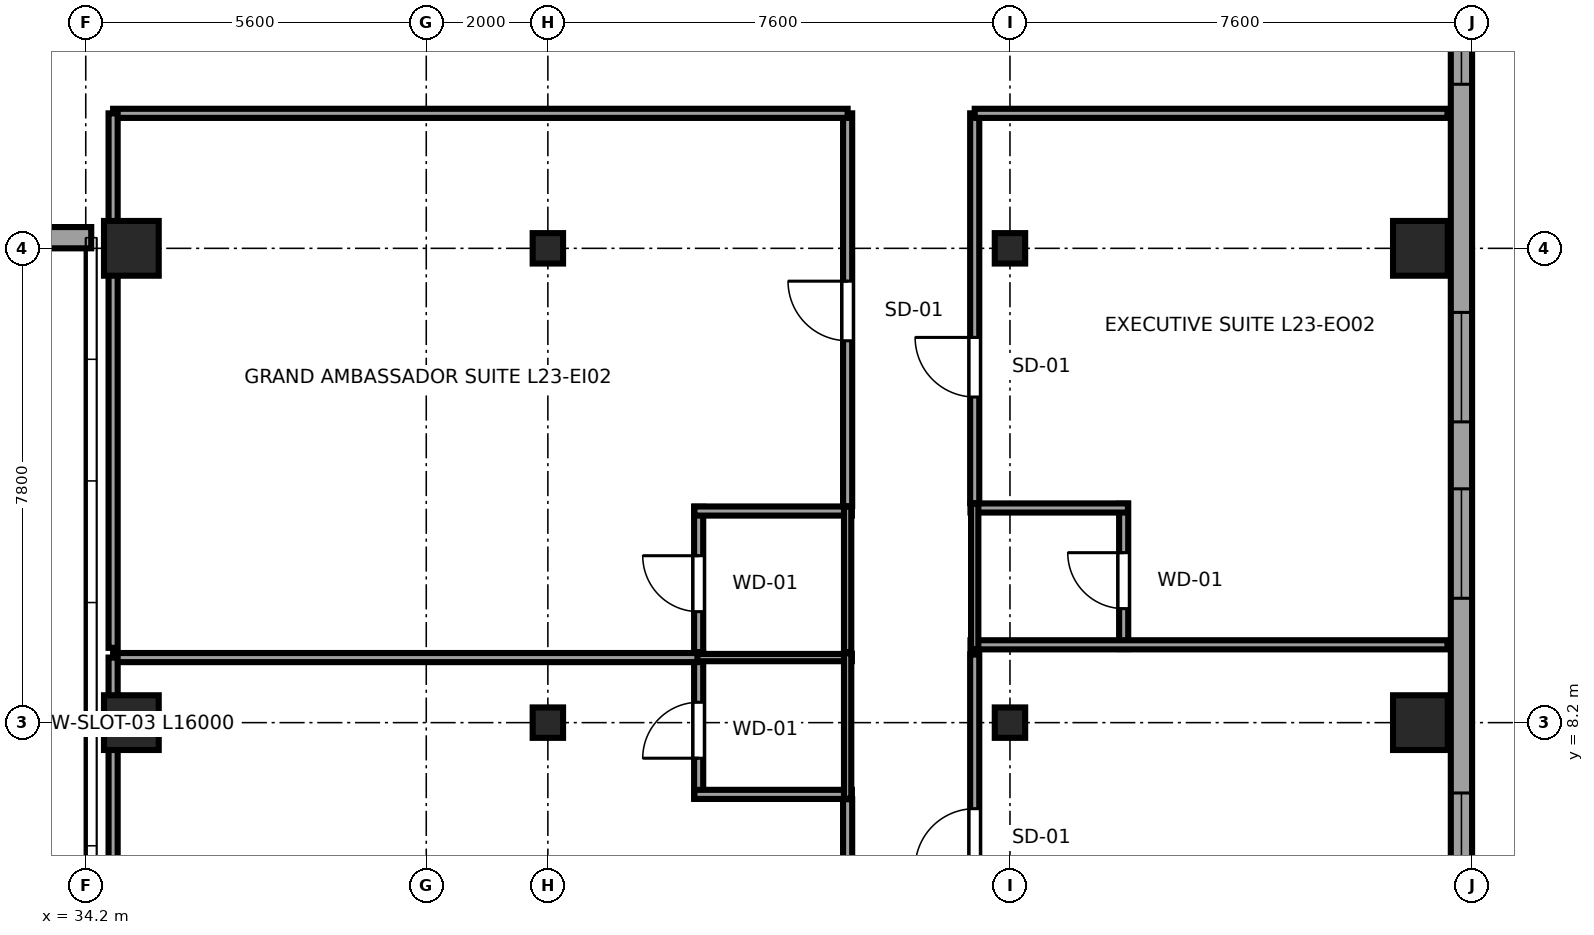
"""IFC4 building model, lengths in metres.
Left out: names, types, materials, properties, quantities, classifications, styles, units other than length and angle.
Written with IfcOpenShell. Run it as: python <this file> out.ifc"""

import sys

from ifc_helpers import new_model, si_unit, direction, frame, frame_2d, origin, origin_2d, place, context, subcontext, project, spatial, rectangle, i_section, extrude, source, transform, mapped, element, fill, save


model = new_model("IFC4")
c1 = context("Model", 3, precision=1e-05, world=origin(), true_north=direction((0.0, 1.0)))
c2 = subcontext(c1, "Body", "Model", "MODEL_VIEW")
j1 = project(units=[si_unit("LENGTHUNIT", "METRE"), si_unit("PLANEANGLEUNIT", "RADIAN")], contexts=[c1])
p1 = place(None, origin())
s1 = spatial("IfcSite", under=j1, at=p1, CompositionType="ELEMENT")
p2 = place(p1, origin())
s2 = spatial("IfcBuilding", under=s1, at=p2, CompositionType="ELEMENT")
p3 = place(p2, frame((0.0, 0.0, 92.35)))
s3 = spatial("IfcBuildingStorey", under=s2, at=p3, CompositionType="ELEMENT", Elevation=92.35)
m1 = source(origin(), c2, "Body", "SweptSolid", [
    extrude(rectangle(XDim=0.9, YDim=0.9, at=origin_2d()), origin(), (0.0, 0.0, 1.0), 3.55),
])
for number, where, z_axis, x_axis in (
    (1, (34.95, 8.2, 0.0), (0.0, 0.0, 1.0), (1.0, 0.0, 0.0)),
    (2, (34.95, 16.0, 0.0), (0.0, 0.0, 1.0), (1.0, 0.0, 0.0)),
):
    element("IfcColumn", number, at=place(p3, frame(where, z_axis=z_axis, x_axis=x_axis)), inside=s3, PredefinedType="COLUMN", context=c2, shape_type="MappedRepresentation", body=[
        mapped(m1, transform((0.0, 0.0, 0.0), x_axis=(1.0, 0.0, 0.0), y_axis=(0.0, 1.0, 0.0), z_axis=(0.0, 0.0, 1.0), scale=1.0)),
    ])
m2 = source(origin(), c2, "Body", "SweptSolid", [
    extrude(i_section(OverallWidth=0.5, OverallDepth=0.5, WebThickness=0.022, FlangeThickness=0.034, at=origin_2d()), origin(), (0.0, 0.0, 1.0), 3.55),
])
for number, where, z_axis, x_axis in (
    (3, (41.8, 8.2, 0.0), (0.0, 0.0, 1.0), (1.0, 0.0, 0.0)),
    (4, (41.8, 16.0, 0.0), (0.0, 0.0, 1.0), (1.0, 0.0, 0.0)),
    (5, (49.4, 8.2, 0.0), (0.0, 0.0, 1.0), (1.0, 0.0, 0.0)),
    (6, (49.4, 16.0, 0.0), (0.0, 0.0, 1.0), (1.0, 0.0, 0.0)),
):
    element("IfcColumn", number, at=place(p3, frame(where, z_axis=z_axis, x_axis=x_axis)), inside=s3, PredefinedType="COLUMN", context=c2, shape_type="MappedRepresentation", body=[
        mapped(m2, transform((0.0, 0.0, 0.0), x_axis=(1.0, 0.0, 0.0), y_axis=(0.0, 1.0, 0.0), z_axis=(0.0, 0.0, 1.0), scale=1.0)),
    ])
for number, where, z_axis, x_axis in (
    (7, (56.15, 8.2, 0.0), (0.0, 0.0, 1.0), (1.0, 0.0, 0.0)),
    (8, (56.15, 16.0, 0.0), (0.0, 0.0, 1.0), (1.0, 0.0, 0.0)),
):
    element("IfcColumn", number, at=place(p3, frame(where, z_axis=z_axis, x_axis=x_axis)), inside=s3, PredefinedType="COLUMN", context=c2, shape_type="MappedRepresentation", body=[
        mapped(m1, transform((0.0, 0.0, 0.0), x_axis=(1.0, 0.0, 0.0), y_axis=(0.0, 1.0, 0.0), z_axis=(0.0, 0.0, 1.0), scale=1.0)),
    ])
p4 = place(p3, frame((22.71, 16.175, 0.0), z_axis=(0.0, 0.0, 1.0), x_axis=(1.0, 0.0, 0.0)))
e9 = element("IfcWall", 9, at=p4, inside=s3, PredefinedType="SOLIDWALL", context=c2, shape_type="SweptSolid", body=[
    extrude(rectangle(XDim=11.58, YDim=0.35, at=frame_2d((5.79, 0.0))), origin(), (0.0, 0.0, 1.0), 2.628),
])
p5 = place(p4, frame((2.295, 0.0, 0.68)))
e10 = element("IfcOpeningElement", 10, at=p5, cuts=e9, PredefinedType="OPENING", context=c2, shape_type="SweptSolid", body=[
    extrude(rectangle(XDim=1.8, YDim=1.85, at=frame_2d((0.9, 0.925))), frame((0.0, 0.185, 0.0), z_axis=(0.0, -1.0, 0.0), x_axis=(1.0, 0.0, 0.0)), (0.0, 0.0, 1.0), 0.37),
])
p6 = place(p4, frame((7.485, 0.0, 0.68)))
e11 = element("IfcOpeningElement", 11, at=p6, cuts=e9, PredefinedType="OPENING", context=c2, shape_type="SweptSolid", body=[
    extrude(rectangle(XDim=1.8, YDim=1.85, at=frame_2d((0.9, 0.925))), frame((0.0, 0.185, 0.0), z_axis=(0.0, -1.0, 0.0), x_axis=(1.0, 0.0, 0.0)), (0.0, 0.0, 1.0), 0.37),
])
p7 = place(p3, frame((56.825, 4.617, 0.0), z_axis=(0.0, 0.0, 1.0), x_axis=(0.0, 1.0, 0.0)))
e12 = element("IfcWall", 12, at=p7, inside=s3, PredefinedType="SOLIDWALL", context=c2, shape_type="SweptSolid", body=[
    extrude(rectangle(XDim=36.766, YDim=0.35, at=frame_2d((18.383, 0.0))), origin(), (0.0, 0.0, 1.0), 3.25),
])
p8 = place(p7, frame((0.626, 0.0, 0.68)))
e13 = element("IfcOpeningElement", 13, at=p8, cuts=e12, PredefinedType="OPENING", context=c2, shape_type="SweptSolid", body=[
    extrude(rectangle(XDim=1.8, YDim=1.85, at=frame_2d((0.9, 0.925))), frame((0.0, 0.185, 0.0), z_axis=(0.0, -1.0, 0.0), x_axis=(1.0, 0.0, 0.0)), (0.0, 0.0, 1.0), 0.37),
])
p9 = place(p7, frame((5.628, 0.0, 0.68)))
e14 = element("IfcOpeningElement", 14, at=p9, cuts=e12, PredefinedType="OPENING", context=c2, shape_type="SweptSolid", body=[
    extrude(rectangle(XDim=1.8, YDim=1.85, at=frame_2d((0.9, 0.925))), frame((0.0, 0.185, 0.0), z_axis=(0.0, -1.0, 0.0), x_axis=(1.0, 0.0, 0.0)), (0.0, 0.0, 1.0), 0.37),
])
p10 = place(p7, frame((8.529, 0.0, 0.68)))
e15 = element("IfcOpeningElement", 15, at=p10, cuts=e12, PredefinedType="OPENING", context=c2, shape_type="SweptSolid", body=[
    extrude(rectangle(XDim=1.8, YDim=1.85, at=frame_2d((0.9, 0.925))), frame((0.0, 0.185, 0.0), z_axis=(0.0, -1.0, 0.0), x_axis=(1.0, 0.0, 0.0)), (0.0, 0.0, 1.0), 0.37),
])
p11 = place(p7, frame((14.081, 0.0, 0.68)))
e16 = element("IfcOpeningElement", 16, at=p11, cuts=e12, PredefinedType="OPENING", context=c2, shape_type="SweptSolid", body=[
    extrude(rectangle(XDim=1.8, YDim=1.85, at=frame_2d((0.9, 0.925))), frame((0.0, 0.185, 0.0), z_axis=(0.0, -1.0, 0.0), x_axis=(1.0, 0.0, 0.0)), (0.0, 0.0, 1.0), 0.37),
])
p12 = place(p7, frame((25.386, 0.0, 0.68)))
e17 = element("IfcOpeningElement", 17, at=p12, cuts=e12, PredefinedType="OPENING", context=c2, shape_type="SweptSolid", body=[
    extrude(rectangle(XDim=1.8, YDim=1.85, at=frame_2d((0.9, 0.925))), frame((0.0, 0.185, 0.0), z_axis=(0.0, -1.0, 0.0), x_axis=(1.0, 0.0, 0.0)), (0.0, 0.0, 1.0), 0.37),
])
p13 = place(p7, frame((30.388, 0.0, 0.68)))
e18 = element("IfcOpeningElement", 18, at=p13, cuts=e12, PredefinedType="OPENING", context=c2, shape_type="SweptSolid", body=[
    extrude(rectangle(XDim=1.8, YDim=1.85, at=frame_2d((0.9, 0.925))), frame((0.0, 0.185, 0.0), z_axis=(0.0, -1.0, 0.0), x_axis=(1.0, 0.0, 0.0)), (0.0, 0.0, 1.0), 0.37),
])
p14 = place(p7, frame((33.29, 0.0, 0.68)))
e19 = element("IfcOpeningElement", 19, at=p14, cuts=e12, PredefinedType="OPENING", context=c2, shape_type="SweptSolid", body=[
    extrude(rectangle(XDim=1.8, YDim=1.85, at=frame_2d((0.9, 0.925))), frame((0.0, 0.185, 0.0), z_axis=(0.0, -1.0, 0.0), x_axis=(1.0, 0.0, 0.0)), (0.0, 0.0, 1.0), 0.37),
])
p15 = place(p3, frame((44.28, 6.95, 0.0), z_axis=(0.0, 0.0, 1.0), x_axis=(0.0, 1.0, 0.0)))
e20 = element("IfcWall", 20, at=p15, inside=s3, PredefinedType="PARTITIONING", context=c2, shape_type="SweptSolid", body=[
    extrude(rectangle(XDim=2.39, YDim=0.15, at=frame_2d((1.195, 0.0))), origin(), (0.0, 0.0, 1.0), 3.25),
])
p16 = place(p15, frame((0.665, 0.0, 0.0)))
e21 = element("IfcOpeningElement", 21, at=p16, cuts=e20, PredefinedType="OPENING", context=c2, shape_type="SweptSolid", body=[
    extrude(rectangle(XDim=0.92, YDim=2.01, at=frame_2d((0.46, 1.005))), frame((0.0, 0.085, 0.0), z_axis=(0.0, -1.0, 0.0), x_axis=(1.0, 0.0, 0.0)), (0.0, 0.0, 1.0), 0.17),
])
p17 = place(p3, frame((44.21, 7.02, 0.0), z_axis=(0.0, 0.0, 1.0), x_axis=(1.0, 0.0, 0.0)))
e22 = element("IfcWall", 22, at=p17, inside=s3, PredefinedType="PARTITIONING", context=c2, shape_type="SweptSolid", body=[
    extrude(rectangle(XDim=2.59, YDim=0.15, at=frame_2d((1.295, 0.0))), origin(), (0.0, 0.0, 1.0), 3.25),
])
p18 = place(p3, frame((44.21, 9.27, 0.0), z_axis=(0.0, 0.0, 1.0), x_axis=(1.0, 0.0, 0.0)))
e23 = element("IfcWall", 23, at=p18, inside=s3, PredefinedType="PLUMBINGWALL", context=c2, shape_type="SweptSolid", body=[
    extrude(rectangle(XDim=2.59, YDim=0.12, at=frame_2d((1.295, 0.0))), origin(), (0.0, 0.0, 1.0), 3.25),
])
p19 = place(p3, frame((46.73, 6.95, 0.0), z_axis=(0.0, 0.0, 1.0), x_axis=(0.0, 1.0, 0.0)))
e24 = element("IfcWall", 24, at=p19, inside=s3, PredefinedType="PLUMBINGWALL", context=c2, shape_type="SweptSolid", body=[
    extrude(rectangle(XDim=2.39, YDim=0.12, at=frame_2d((1.195, 0.0))), origin(), (0.0, 0.0, 1.0), 3.25),
])
p20 = place(p3, frame((44.28, 9.36, 0.0), z_axis=(0.0, 0.0, 1.0), x_axis=(0.0, 1.0, 0.0)))
e25 = element("IfcWall", 25, at=p20, inside=s3, PredefinedType="PARTITIONING", context=c2, shape_type="SweptSolid", body=[
    extrude(rectangle(XDim=2.39, YDim=0.15, at=frame_2d((1.195, 0.0))), origin(), (0.0, 0.0, 1.0), 3.25),
])
p21 = place(p20, frame((0.665, 0.0, 0.0)))
e26 = element("IfcOpeningElement", 26, at=p21, cuts=e25, PredefinedType="OPENING", context=c2, shape_type="SweptSolid", body=[
    extrude(rectangle(XDim=0.92, YDim=2.01, at=frame_2d((0.46, 1.005))), frame((0.0, 0.085, 0.0), z_axis=(0.0, -1.0, 0.0), x_axis=(1.0, 0.0, 0.0)), (0.0, 0.0, 1.0), 0.17),
])
p22 = place(p3, frame((44.21, 11.68, 0.0), z_axis=(0.0, 0.0, 1.0), x_axis=(1.0, 0.0, 0.0)))
e27 = element("IfcWall", 27, at=p22, inside=s3, PredefinedType="PARTITIONING", context=c2, shape_type="SweptSolid", body=[
    extrude(rectangle(XDim=2.59, YDim=0.15, at=frame_2d((1.295, 0.0))), origin(), (0.0, 0.0, 1.0), 3.25),
])
p23 = place(p3, frame((46.73, 9.36, 0.0), z_axis=(0.0, 0.0, 1.0), x_axis=(0.0, 1.0, 0.0)))
e28 = element("IfcWall", 28, at=p23, inside=s3, PredefinedType="PLUMBINGWALL", context=c2, shape_type="SweptSolid", body=[
    extrude(rectangle(XDim=2.39, YDim=0.12, at=frame_2d((1.195, 0.0))), origin(), (0.0, 0.0, 1.0), 3.25),
])
p24 = place(p3, frame((51.27, 9.41, 0.0), z_axis=(0.0, 0.0, 1.0), x_axis=(0.0, 1.0, 0.0)))
e29 = element("IfcWall", 29, at=p24, inside=s3, PredefinedType="PARTITIONING", context=c2, shape_type="SweptSolid", body=[
    extrude(rectangle(XDim=2.39, YDim=0.15, at=frame_2d((1.195, 0.0))), origin(), (0.0, 0.0, 1.0), 3.25),
])
p25 = place(p24, frame((0.665, 0.0, 0.0)))
e30 = element("IfcOpeningElement", 30, at=p25, cuts=e29, PredefinedType="OPENING", context=c2, shape_type="SweptSolid", body=[
    extrude(rectangle(XDim=0.92, YDim=2.01, at=frame_2d((0.46, 1.005))), frame((0.0, 0.085, 0.0), z_axis=(0.0, -1.0, 0.0), x_axis=(1.0, 0.0, 0.0)), (0.0, 0.0, 1.0), 0.17),
])
p26 = place(p3, frame((48.75, 9.48, 0.0), z_axis=(0.0, 0.0, 1.0), x_axis=(1.0, 0.0, 0.0)))
e31 = element("IfcWall", 31, at=p26, inside=s3, PredefinedType="PARTITIONING", context=c2, shape_type="SweptSolid", body=[
    extrude(rectangle(XDim=7.845, YDim=0.15, at=frame_2d((3.922, 0.0))), origin(), (0.0, 0.0, 1.0), 3.25),
])
p27 = place(p3, frame((48.75, 11.73, 0.0), z_axis=(0.0, 0.0, 1.0), x_axis=(1.0, 0.0, 0.0)))
e32 = element("IfcWall", 32, at=p27, inside=s3, PredefinedType="PARTITIONING", context=c2, shape_type="SweptSolid", body=[
    extrude(rectangle(XDim=2.59, YDim=0.15, at=frame_2d((1.295, 0.0))), origin(), (0.0, 0.0, 1.0), 3.25),
])
p28 = place(p3, frame((48.82, 9.41, 0.0), z_axis=(0.0, 0.0, 1.0), x_axis=(0.0, 1.0, 0.0)))
e33 = element("IfcWall", 33, at=p28, inside=s3, PredefinedType="PLUMBINGWALL", context=c2, shape_type="SweptSolid", body=[
    extrude(rectangle(XDim=2.39, YDim=0.12, at=frame_2d((1.195, 0.0))), origin(), (0.0, 0.0, 1.0), 3.25),
])
p29 = place(p3, frame((46.73, 0.405, 0.0), z_axis=(0.0, 0.0, 1.0), x_axis=(0.0, 1.0, 0.0)))
e34 = element("IfcWall", 34, at=p29, inside=s3, PredefinedType="PARTITIONING", context=c2, shape_type="SweptSolid", body=[
    extrude(rectangle(XDim=6.535, YDim=0.15, at=frame_2d((3.268, 0.0))), origin(), (0.0, 0.0, 1.0), 3.25),
])
p30 = place(p29, frame((2.785, 0.0, 0.0)))
e35 = element("IfcOpeningElement", 35, at=p30, cuts=e34, PredefinedType="OPENING", context=c2, shape_type="SweptSolid", body=[
    extrude(rectangle(XDim=0.98, YDim=2.12, at=frame_2d((0.49, 1.06))), frame((0.0, 0.085, 0.0), z_axis=(0.0, -1.0, 0.0), x_axis=(1.0, 0.0, 0.0)), (0.0, 0.0, 1.0), 0.17),
])
p31 = place(p3, frame((34.65, 9.27, 0.0), z_axis=(0.0, 0.0, 1.0), x_axis=(1.0, 0.0, 0.0)))
e36 = element("IfcWall", 36, at=p31, inside=s3, PredefinedType="PARTITIONING", context=c2, shape_type="SweptSolid", body=[
    extrude(rectangle(XDim=9.61, YDim=0.15, at=frame_2d((4.805, 0.0))), origin(), (0.0, 0.0, 1.0), 3.25),
])
p32 = place(p3, frame((34.65, 0.405, 0.0), z_axis=(0.0, 0.0, 1.0), x_axis=(0.0, 1.0, 0.0)))
e37 = element("IfcWall", 37, at=p32, inside=s3, PredefinedType="PARTITIONING", context=c2, shape_type="SweptSolid", body=[
    extrude(rectangle(XDim=8.865, YDim=0.15, at=frame_2d((4.433, 0.0))), origin(), (0.0, 0.0, 1.0), 3.25),
])
p33 = place(p3, frame((46.73, 11.76, 0.0), z_axis=(0.0, 0.0, 1.0), x_axis=(0.0, 1.0, 0.0)))
e38 = element("IfcWall", 38, at=p33, inside=s3, PredefinedType="PARTITIONING", context=c2, shape_type="SweptSolid", body=[
    extrude(rectangle(XDim=6.46, YDim=0.15, at=frame_2d((3.23, 0.0))), origin(), (0.0, 0.0, 1.0), 3.25),
])
p34 = place(p33, frame((2.72, 0.0, 0.0)))
e39 = element("IfcOpeningElement", 39, at=p34, cuts=e38, PredefinedType="OPENING", context=c2, shape_type="SweptSolid", body=[
    extrude(rectangle(XDim=0.98, YDim=2.12, at=frame_2d((0.49, 1.06))), frame((0.0, 0.085, 0.0), z_axis=(0.0, -1.0, 0.0), x_axis=(1.0, 0.0, 0.0)), (0.0, 0.0, 1.0), 0.17),
])
p35 = place(p3, frame((34.65, 18.22, 0.0), z_axis=(0.0, 0.0, 1.0), x_axis=(1.0, 0.0, 0.0)))
e40 = element("IfcWall", 40, at=p35, inside=s3, PredefinedType="PARTITIONING", context=c2, shape_type="SweptSolid", body=[
    extrude(rectangle(XDim=12.08, YDim=0.15, at=frame_2d((6.04, 0.0))), origin(), (0.0, 0.0, 1.0), 3.25),
])
p36 = place(p3, frame((34.65, 9.43, 0.0), z_axis=(0.0, 0.0, 1.0), x_axis=(0.0, 1.0, 0.0)))
e41 = element("IfcWall", 41, at=p36, inside=s3, PredefinedType="PARTITIONING", context=c2, shape_type="SweptSolid", body=[
    extrude(rectangle(XDim=8.79, YDim=0.15, at=frame_2d((4.395, 0.0))), origin(), (0.0, 0.0, 1.0), 3.25),
])
p37 = place(p3, frame((48.82, 3.31, 0.0), z_axis=(0.0, 0.0, 1.0), x_axis=(0.0, 1.0, 0.0)))
e42 = element("IfcWall", 42, at=p37, inside=s3, PredefinedType="PARTITIONING", context=c2, shape_type="SweptSolid", body=[
    extrude(rectangle(XDim=6.01, YDim=0.15, at=frame_2d((3.005, 0.0))), origin(), (0.0, 0.0, 1.0), 3.25),
])
p38 = place(p37, frame((2.495, 0.0, 0.0)))
e43 = element("IfcOpeningElement", 43, at=p38, cuts=e42, PredefinedType="OPENING", context=c2, shape_type="SweptSolid", body=[
    extrude(rectangle(XDim=0.98, YDim=2.12, at=frame_2d((0.49, 1.06))), frame((0.0, 0.085, 0.0), z_axis=(0.0, -1.0, 0.0), x_axis=(1.0, 0.0, 0.0)), (0.0, 0.0, 1.0), 0.17),
])
p39 = place(p3, frame((48.82, 11.81, 0.0), z_axis=(0.0, 0.0, 1.0), x_axis=(0.0, 1.0, 0.0)))
e44 = element("IfcWall", 44, at=p39, inside=s3, PredefinedType="PARTITIONING", context=c2, shape_type="SweptSolid", body=[
    extrude(rectangle(XDim=6.41, YDim=0.15, at=frame_2d((3.205, 0.0))), origin(), (0.0, 0.0, 1.0), 3.25),
])
p40 = place(p39, frame((1.745, 0.0, 0.0)))
e45 = element("IfcOpeningElement", 45, at=p40, cuts=e44, PredefinedType="OPENING", context=c2, shape_type="SweptSolid", body=[
    extrude(rectangle(XDim=0.98, YDim=2.12, at=frame_2d((0.49, 1.06))), frame((0.0, 0.085, 0.0), z_axis=(0.0, -1.0, 0.0), x_axis=(1.0, 0.0, 0.0)), (0.0, 0.0, 1.0), 0.17),
])
p41 = place(p3, frame((48.82, 18.22, 0.0), z_axis=(0.0, 0.0, 1.0), x_axis=(1.0, 0.0, 0.0)))
e46 = element("IfcWall", 46, at=p41, inside=s3, PredefinedType="PARTITIONING", context=c2, shape_type="SweptSolid", body=[
    extrude(rectangle(XDim=7.775, YDim=0.15, at=frame_2d((3.887, 0.0))), origin(), (0.0, 0.0, 1.0), 3.25),
])
m3 = source(origin(), c2, "Body", "SweptSolid", [
    extrude(rectangle(XDim=1.8, YDim=1.85, at=frame_2d((0.9, 0.925))), frame((0.0, 0.09, 0.0), z_axis=(0.0, -1.0, 0.0), x_axis=(1.0, 0.0, 0.0)), (0.0, 0.0, 1.0), 0.06),
])
p42 = place(p8, origin())
e47 = element("IfcWindow", 47, at=p42, inside=s3, PartitioningType="TRIPLE_PANEL_HORIZONTAL", PredefinedType="WINDOW", context=c2, shape_type="MappedRepresentation", body=[
    mapped(m3, transform((0.0, 0.0, 0.0), x_axis=(1.0, 0.0, 0.0), y_axis=(0.0, 1.0, 0.0), z_axis=(0.0, 0.0, 1.0), scale=1.0)),
])
fill(e13, e47)
p43 = place(p9, origin())
e48 = element("IfcWindow", 48, at=p43, inside=s3, PartitioningType="TRIPLE_PANEL_HORIZONTAL", PredefinedType="WINDOW", context=c2, shape_type="MappedRepresentation", body=[
    mapped(m3, transform((0.0, 0.0, 0.0), x_axis=(1.0, 0.0, 0.0), y_axis=(0.0, 1.0, 0.0), z_axis=(0.0, 0.0, 1.0), scale=1.0)),
])
fill(e14, e48)
p44 = place(p10, origin())
e49 = element("IfcWindow", 49, at=p44, inside=s3, PartitioningType="TRIPLE_PANEL_HORIZONTAL", PredefinedType="WINDOW", context=c2, shape_type="MappedRepresentation", body=[
    mapped(m3, transform((0.0, 0.0, 0.0), x_axis=(1.0, 0.0, 0.0), y_axis=(0.0, 1.0, 0.0), z_axis=(0.0, 0.0, 1.0), scale=1.0)),
])
fill(e15, e49)
p45 = place(p11, origin())
e50 = element("IfcWindow", 50, at=p45, inside=s3, PartitioningType="TRIPLE_PANEL_HORIZONTAL", PredefinedType="WINDOW", context=c2, shape_type="MappedRepresentation", body=[
    mapped(m3, transform((0.0, 0.0, 0.0), x_axis=(1.0, 0.0, 0.0), y_axis=(0.0, 1.0, 0.0), z_axis=(0.0, 0.0, 1.0), scale=1.0)),
])
fill(e16, e50)
m4 = source(origin(), c2, "Body", "SweptSolid", [
    extrude(rectangle(XDim=0.92, YDim=2.01, at=frame_2d((0.46, 1.005))), frame((0.0, 0.025, 0.0), z_axis=(0.0, -1.0, 0.0), x_axis=(1.0, 0.0, 0.0)), (0.0, 0.0, 1.0), 0.05),
])
p46 = place(p16, origin())
e51 = element("IfcDoor", 51, at=p46, inside=s3, OperationType="SINGLE_SWING_LEFT", PredefinedType="DOOR", context=c2, shape_type="MappedRepresentation", body=[
    mapped(m4, transform((0.0, 0.0, 0.0), x_axis=(1.0, 0.0, 0.0), y_axis=(0.0, 1.0, 0.0), z_axis=(0.0, 0.0, 1.0), scale=1.0)),
])
fill(e21, e51)
p47 = place(p21, origin())
e52 = element("IfcDoor", 52, at=p47, inside=s3, OperationType="SINGLE_SWING_RIGHT", PredefinedType="DOOR", context=c2, shape_type="MappedRepresentation", body=[
    mapped(m4, transform((0.0, 0.0, 0.0), x_axis=(1.0, 0.0, 0.0), y_axis=(0.0, 1.0, 0.0), z_axis=(0.0, 0.0, 1.0), scale=1.0)),
])
fill(e26, e52)
p48 = place(p25, origin())
e53 = element("IfcDoor", 53, at=p48, inside=s3, OperationType="SINGLE_SWING_RIGHT", PredefinedType="DOOR", context=c2, shape_type="MappedRepresentation", body=[
    mapped(m4, transform((0.0, 0.0, 0.0), x_axis=(1.0, 0.0, 0.0), y_axis=(0.0, 1.0, 0.0), z_axis=(0.0, 0.0, 1.0), scale=1.0)),
])
fill(e30, e53)
m5 = source(origin(), c2, "Body", "SweptSolid", [
    extrude(rectangle(XDim=0.98, YDim=2.12, at=frame_2d((0.49, 1.06))), frame((0.0, 0.025, 0.0), z_axis=(0.0, -1.0, 0.0), x_axis=(1.0, 0.0, 0.0)), (0.0, 0.0, 1.0), 0.05),
])
p49 = place(p34, origin())
e54 = element("IfcDoor", 54, at=p49, inside=s3, OperationType="SINGLE_SWING_RIGHT", PredefinedType="DOOR", context=c2, shape_type="MappedRepresentation", body=[
    mapped(m5, transform((0.0, 0.0, 0.0), x_axis=(1.0, 0.0, 0.0), y_axis=(0.0, 1.0, 0.0), z_axis=(0.0, 0.0, 1.0), scale=1.0)),
])
fill(e39, e54)
p50 = place(p38, origin())
e55 = element("IfcDoor", 55, at=p50, inside=s3, OperationType="SINGLE_SWING_LEFT", PredefinedType="DOOR", context=c2, shape_type="MappedRepresentation", body=[
    mapped(m5, transform((0.0, 0.0, 0.0), x_axis=(1.0, 0.0, 0.0), y_axis=(0.0, 1.0, 0.0), z_axis=(0.0, 0.0, 1.0), scale=1.0)),
])
fill(e43, e55)
p51 = place(p40, origin())
e56 = element("IfcDoor", 56, at=p51, inside=s3, OperationType="SINGLE_SWING_RIGHT", PredefinedType="DOOR", context=c2, shape_type="MappedRepresentation", body=[
    mapped(m5, transform((0.0, 0.0, 0.0), x_axis=(1.0, 0.0, 0.0), y_axis=(0.0, 1.0, 0.0), z_axis=(0.0, 0.0, 1.0), scale=1.0)),
])
fill(e45, e56)
save(model, sys.argv[1])
